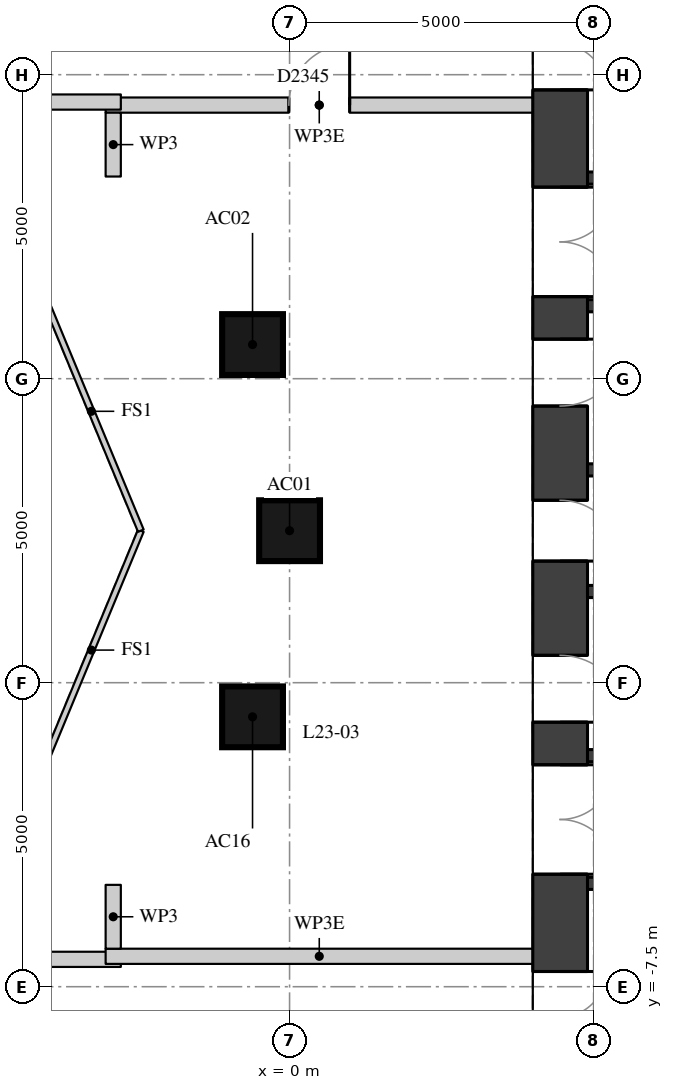
"""IFC4 building model, lengths in metres.
Left out: names, types, materials, properties, quantities, classifications, styles, units other than length and angle.
Written with IfcOpenShell. Run it as: python <this file> out.ifc"""

import sys

from ifc_helpers import new_model, si_unit, direction, frame, frame_2d, origin, origin_2d, place, context, subcontext, project, spatial, rectangle, extrude, element, fill, save


model = new_model("IFC4")
c1 = context("Model", 3, precision=1e-05, world=origin(), true_north=direction((0.0, 1.0)))
c2 = subcontext(c1, "Body", "Model", "MODEL_VIEW")
j1 = project(units=[si_unit("LENGTHUNIT", "METRE"), si_unit("PLANEANGLEUNIT", "RADIAN")], contexts=[c1])
p1 = place(None, origin())
s1 = spatial("IfcSite", under=j1, at=p1, CompositionType="ELEMENT")
p2 = place(p1, origin())
s2 = spatial("IfcBuilding", under=s1, at=p2, CompositionType="ELEMENT")
p3 = place(p2, frame((0.0, 0.0, 84.4)))
s3 = spatial("IfcBuildingStorey", under=s2, at=p3, CompositionType="ELEMENT", Elevation=84.4)
for number, where, z_axis, x_axis in (
    (1, (0.0, 0.0, 0.0), (0.0, 0.0, 1.0), (1.0, 0.0, 0.0)),
    (2, (-0.609, 3.062, 0.0), (0.0, 0.0, 1.0), (1.0, 0.0, 0.0)),
    (3, (-0.609, -3.062, 0.0), (0.0, 0.0, 1.0), (1.0, 0.0, 0.0)),
):
    element("IfcColumn", number, at=place(p3, frame(where, z_axis=z_axis, x_axis=x_axis)), inside=s3, PredefinedType="COLUMN", context=c2, shape_type="SweptSolid", body=[
        extrude(rectangle(XDim=1.0, YDim=1.0, at=origin_2d()), origin(), (0.0, 0.0, 1.0), 4.5),
    ])
p4 = place(p3, frame((4.45, -11.1, 0.0), z_axis=(0.0, 0.0, 1.0), x_axis=(0.0, 1.0, 0.0)))
e4 = element("IfcWall", 4, at=p4, inside=s3, PredefinedType="SHEAR", context=c2, shape_type="SweptSolid", body=[
    extrude(rectangle(XDim=22.2, YDim=0.9, at=frame_2d((11.1, 0.0))), origin(), (0.0, 0.0, 1.0), 4.22),
])
p5 = place(p4, frame((2.35, 0.0, 0.0)))
e5 = element("IfcOpeningElement", 5, at=p5, cuts=e4, PredefinedType="OPENING", context=c2, shape_type="SweptSolid", body=[
    extrude(rectangle(XDim=1.5, YDim=2.1, at=frame_2d((0.75, 1.05))), frame((0.0, 0.46, 0.0), z_axis=(0.0, -1.0, 0.0), x_axis=(1.0, 0.0, 0.0)), (0.0, 0.0, 1.0), 0.92),
])
p6 = place(p4, frame((5.45, 0.0, 0.0)))
e6 = element("IfcOpeningElement", 6, at=p6, cuts=e4, PredefinedType="OPENING", context=c2, shape_type="SweptSolid", body=[
    extrude(rectangle(XDim=1.8, YDim=2.1, at=frame_2d((0.9, 1.05))), frame((0.0, 0.46, 0.0), z_axis=(0.0, -1.0, 0.0), x_axis=(1.0, 0.0, 0.0)), (0.0, 0.0, 1.0), 0.92),
])
p7 = place(p4, frame((7.95, 0.0, 0.0)))
e7 = element("IfcOpeningElement", 7, at=p7, cuts=e4, PredefinedType="OPENING", context=c2, shape_type="SweptSolid", body=[
    extrude(rectangle(XDim=1.1, YDim=2.1, at=frame_2d((0.55, 1.05))), frame((0.0, 0.46, 0.0), z_axis=(0.0, -1.0, 0.0), x_axis=(1.0, 0.0, 0.0)), (0.0, 0.0, 1.0), 0.92),
])
p8 = place(p4, frame((10.6, 0.0, 0.0)))
e8 = element("IfcOpeningElement", 8, at=p8, cuts=e4, PredefinedType="OPENING", context=c2, shape_type="SweptSolid", body=[
    extrude(rectangle(XDim=1.0, YDim=2.1, at=frame_2d((0.5, 1.05))), frame((0.0, 0.46, 0.0), z_axis=(0.0, -1.0, 0.0), x_axis=(1.0, 0.0, 0.0)), (0.0, 0.0, 1.0), 0.92),
])
p9 = place(p4, frame((13.15, 0.0, 0.0)))
e9 = element("IfcOpeningElement", 9, at=p9, cuts=e4, PredefinedType="OPENING", context=c2, shape_type="SweptSolid", body=[
    extrude(rectangle(XDim=1.1, YDim=2.1, at=frame_2d((0.55, 1.05))), frame((0.0, 0.46, 0.0), z_axis=(0.0, -1.0, 0.0), x_axis=(1.0, 0.0, 0.0)), (0.0, 0.0, 1.0), 0.92),
])
p10 = place(p4, frame((14.95, 0.0, 0.0)))
e10 = element("IfcOpeningElement", 10, at=p10, cuts=e4, PredefinedType="OPENING", context=c2, shape_type="SweptSolid", body=[
    extrude(rectangle(XDim=1.8, YDim=2.1, at=frame_2d((0.9, 1.05))), frame((0.0, 0.46, 0.0), z_axis=(0.0, -1.0, 0.0), x_axis=(1.0, 0.0, 0.0)), (0.0, 0.0, 1.0), 0.92),
])
p11 = place(p4, frame((18.35, 0.0, 0.0)))
e11 = element("IfcOpeningElement", 11, at=p11, cuts=e4, PredefinedType="OPENING", context=c2, shape_type="SweptSolid", body=[
    extrude(rectangle(XDim=1.5, YDim=2.1, at=frame_2d((0.75, 1.05))), frame((0.0, 0.46, 0.0), z_axis=(0.0, -1.0, 0.0), x_axis=(1.0, 0.0, 0.0)), (0.0, 0.0, 1.0), 0.92),
])
for number, where, z_axis, x_axis in (
    (12, (4.9, 5.8, 0.0), (0.0, 0.0, 1.0), (1.0, 0.0, 0.0)),
    (13, (4.9, 3.7, 0.0), (0.0, 0.0, 1.0), (1.0, 0.0, 0.0)),
    (14, (4.9, 1.0, 0.0), (0.0, 0.0, 1.0), (1.0, 0.0, 0.0)),
    (15, (4.9, -1.0, 0.0), (0.0, 0.0, 1.0), (1.0, 0.0, 0.0)),
    (16, (4.9, -3.7, 0.0), (0.0, 0.0, 1.0), (1.0, 0.0, 0.0)),
    (17, (4.9, -5.8, 0.0), (0.0, 0.0, 1.0), (1.0, 0.0, 0.0)),
):
    element("IfcWall", number, at=place(p3, frame(where, z_axis=z_axis, x_axis=x_axis)), inside=s3, PredefinedType="SHEAR", context=c2, shape_type="SweptSolid", body=[
        extrude(rectangle(XDim=10.2, YDim=0.2, at=frame_2d((5.1, 0.0))), origin(), (0.0, 0.0, 1.0), 4.22),
    ])
p12 = place(p3, frame((-9.375, -7.05, 0.0), z_axis=(0.0, 0.0, 1.0), x_axis=(1.0, 0.0, 0.0)))
e18 = element("IfcWall", 18, at=p12, inside=s3, PredefinedType="PARTITIONING", context=c2, shape_type="SweptSolid", body=[
    extrude(rectangle(XDim=6.6, YDim=0.25, at=frame_2d((3.3, 0.0))), origin(), (0.0, 0.0, 1.0), 3.67),
])
p13 = place(p3, frame((-3.025, -7.0, 0.0), z_axis=(0.0, 0.0, 1.0), x_axis=(1.0, 0.0, 0.0)))
e19 = element("IfcWall", 19, at=p13, inside=s3, PredefinedType="PARTITIONING", context=c2, shape_type="SweptSolid", body=[
    extrude(rectangle(XDim=7.027, YDim=0.25, at=frame_2d((3.513, 0.0))), origin(), (0.0, 0.0, 1.0), 3.67),
])
p14 = place(p3, frame((-3.025, 7.0, 0.0), z_axis=(0.0, 0.0, 1.0), x_axis=(1.0, 0.0, 0.0)))
e20 = element("IfcWall", 20, at=p14, inside=s3, PredefinedType="PARTITIONING", context=c2, shape_type="SweptSolid", body=[
    extrude(rectangle(XDim=7.027, YDim=0.25, at=frame_2d((3.513, 0.0))), origin(), (0.0, 0.0, 1.0), 3.67),
])
p15 = place(p14, frame((3.013, 0.0, 0.0)))
e21 = element("IfcOpeningElement", 21, at=p15, cuts=e20, PredefinedType="OPENING", context=c2, shape_type="SweptSolid", body=[
    extrude(rectangle(XDim=1.0, YDim=2.1, at=frame_2d((0.5, 1.05))), frame((0.0, 0.135, 0.0), z_axis=(0.0, -1.0, 0.0), x_axis=(1.0, 0.0, 0.0)), (0.0, 0.0, 1.0), 0.27),
])
p16 = place(p3, frame((-9.375, 7.05, 0.0), z_axis=(0.0, 0.0, 1.0), x_axis=(1.0, 0.0, 0.0)))
e22 = element("IfcWall", 22, at=p16, inside=s3, PredefinedType="PARTITIONING", context=c2, shape_type="SweptSolid", body=[
    extrude(rectangle(XDim=6.6, YDim=0.25, at=frame_2d((3.3, 0.0))), origin(), (0.0, 0.0, 1.0), 3.67),
])
for number, where, z_axis, x_axis in (
    (23, (-2.9, -6.875, 0.0), (0.0, 0.0, 1.0), (0.0, 1.0, 0.0)),
    (24, (-2.9, 5.825, 0.0), (0.0, 0.0, 1.0), (0.0, 1.0, 0.0)),
):
    element("IfcWall", number, at=place(p3, frame(where, z_axis=z_axis, x_axis=x_axis)), inside=s3, PredefinedType="PARTITIONING", context=c2, shape_type="SweptSolid", body=[
        extrude(rectangle(XDim=1.05, YDim=0.25, at=frame_2d((0.525, 0.0))), origin(), (0.0, 0.0, 1.0), 4.22),
    ])
for number, where, z_axis, x_axis in (
    (25, (-2.446, 0.0, 0.0), (0.0, 0.0, 1.0), (-0.383, -0.924, 0.0)),
    (26, (-4.073, 3.927, 0.0), (0.0, 0.0, 1.0), (0.383, -0.924, 0.0)),
):
    element("IfcWall", number, at=place(p3, frame(where, z_axis=z_axis, x_axis=x_axis)), inside=s3, PredefinedType="PARTITIONING", context=c2, shape_type="SweptSolid", body=[
        extrude(rectangle(XDim=4.251, YDim=0.1, at=frame_2d((2.125, 0.0))), origin(), (0.0, 0.0, 1.0), 4.22),
    ])
p17 = place(p5, origin())
e27 = element("IfcDoor", 27, at=p17, inside=s3, OperationType="DOUBLE_DOOR_SINGLE_SWING", PredefinedType="DOOR", context=c2, shape_type="SweptSolid", body=[
    extrude(rectangle(XDim=1.5, YDim=2.1, at=frame_2d((0.75, 1.05))), frame((0.0, 0.025, 0.0), z_axis=(0.0, -1.0, 0.0), x_axis=(1.0, 0.0, 0.0)), (0.0, 0.0, 1.0), 0.05),
])
fill(e5, e27)
p18 = place(p6, origin())
e28 = element("IfcDoor", 28, at=p18, inside=s3, OperationType="DOUBLE_DOOR_SINGLE_SWING", PredefinedType="DOOR", context=c2, shape_type="SweptSolid", body=[
    extrude(rectangle(XDim=1.8, YDim=2.1, at=frame_2d((0.9, 1.05))), frame((0.0, 0.025, 0.0), z_axis=(0.0, -1.0, 0.0), x_axis=(1.0, 0.0, 0.0)), (0.0, 0.0, 1.0), 0.05),
])
fill(e6, e28)
p19 = place(p7, origin())
e29 = element("IfcDoor", 29, at=p19, inside=s3, OperationType="SINGLE_SWING_RIGHT", PredefinedType="DOOR", context=c2, shape_type="SweptSolid", body=[
    extrude(rectangle(XDim=1.1, YDim=2.1, at=frame_2d((0.55, 1.05))), frame((0.0, 0.025, 0.0), z_axis=(0.0, -1.0, 0.0), x_axis=(1.0, 0.0, 0.0)), (0.0, 0.0, 1.0), 0.05),
])
fill(e7, e29)
p20 = place(p8, origin())
e30 = element("IfcDoor", 30, at=p20, inside=s3, OperationType="SINGLE_SWING_RIGHT", PredefinedType="DOOR", context=c2, shape_type="SweptSolid", body=[
    extrude(rectangle(XDim=1.0, YDim=2.1, at=frame_2d((0.5, 1.05))), frame((0.0, 0.025, 0.0), z_axis=(0.0, -1.0, 0.0), x_axis=(1.0, 0.0, 0.0)), (0.0, 0.0, 1.0), 0.05),
])
fill(e8, e30)
p21 = place(p9, origin())
e31 = element("IfcDoor", 31, at=p21, inside=s3, OperationType="SINGLE_SWING_LEFT", PredefinedType="DOOR", context=c2, shape_type="SweptSolid", body=[
    extrude(rectangle(XDim=1.1, YDim=2.1, at=frame_2d((0.55, 1.05))), frame((0.0, 0.025, 0.0), z_axis=(0.0, -1.0, 0.0), x_axis=(1.0, 0.0, 0.0)), (0.0, 0.0, 1.0), 0.05),
])
fill(e9, e31)
p22 = place(p10, origin())
e32 = element("IfcDoor", 32, at=p22, inside=s3, OperationType="DOUBLE_DOOR_SINGLE_SWING", PredefinedType="DOOR", context=c2, shape_type="SweptSolid", body=[
    extrude(rectangle(XDim=1.8, YDim=2.1, at=frame_2d((0.9, 1.05))), frame((0.0, 0.025, 0.0), z_axis=(0.0, -1.0, 0.0), x_axis=(1.0, 0.0, 0.0)), (0.0, 0.0, 1.0), 0.05),
])
fill(e10, e32)
p23 = place(p11, origin())
e33 = element("IfcDoor", 33, at=p23, inside=s3, OperationType="DOUBLE_DOOR_SINGLE_SWING", PredefinedType="DOOR", context=c2, shape_type="SweptSolid", body=[
    extrude(rectangle(XDim=1.5, YDim=2.1, at=frame_2d((0.75, 1.05))), frame((0.0, 0.025, 0.0), z_axis=(0.0, -1.0, 0.0), x_axis=(1.0, 0.0, 0.0)), (0.0, 0.0, 1.0), 0.05),
])
fill(e11, e33)
p24 = place(p15, origin())
e34 = element("IfcDoor", 34, at=p24, inside=s3, OperationType="SINGLE_SWING_RIGHT", PredefinedType="DOOR", context=c2, shape_type="SweptSolid", body=[
    extrude(rectangle(XDim=1.0, YDim=2.1, at=frame_2d((0.5, 1.05))), frame((0.0, 0.025, 0.0), z_axis=(0.0, -1.0, 0.0), x_axis=(1.0, 0.0, 0.0)), (0.0, 0.0, 1.0), 0.05),
])
fill(e21, e34)
save(model, sys.argv[1])
